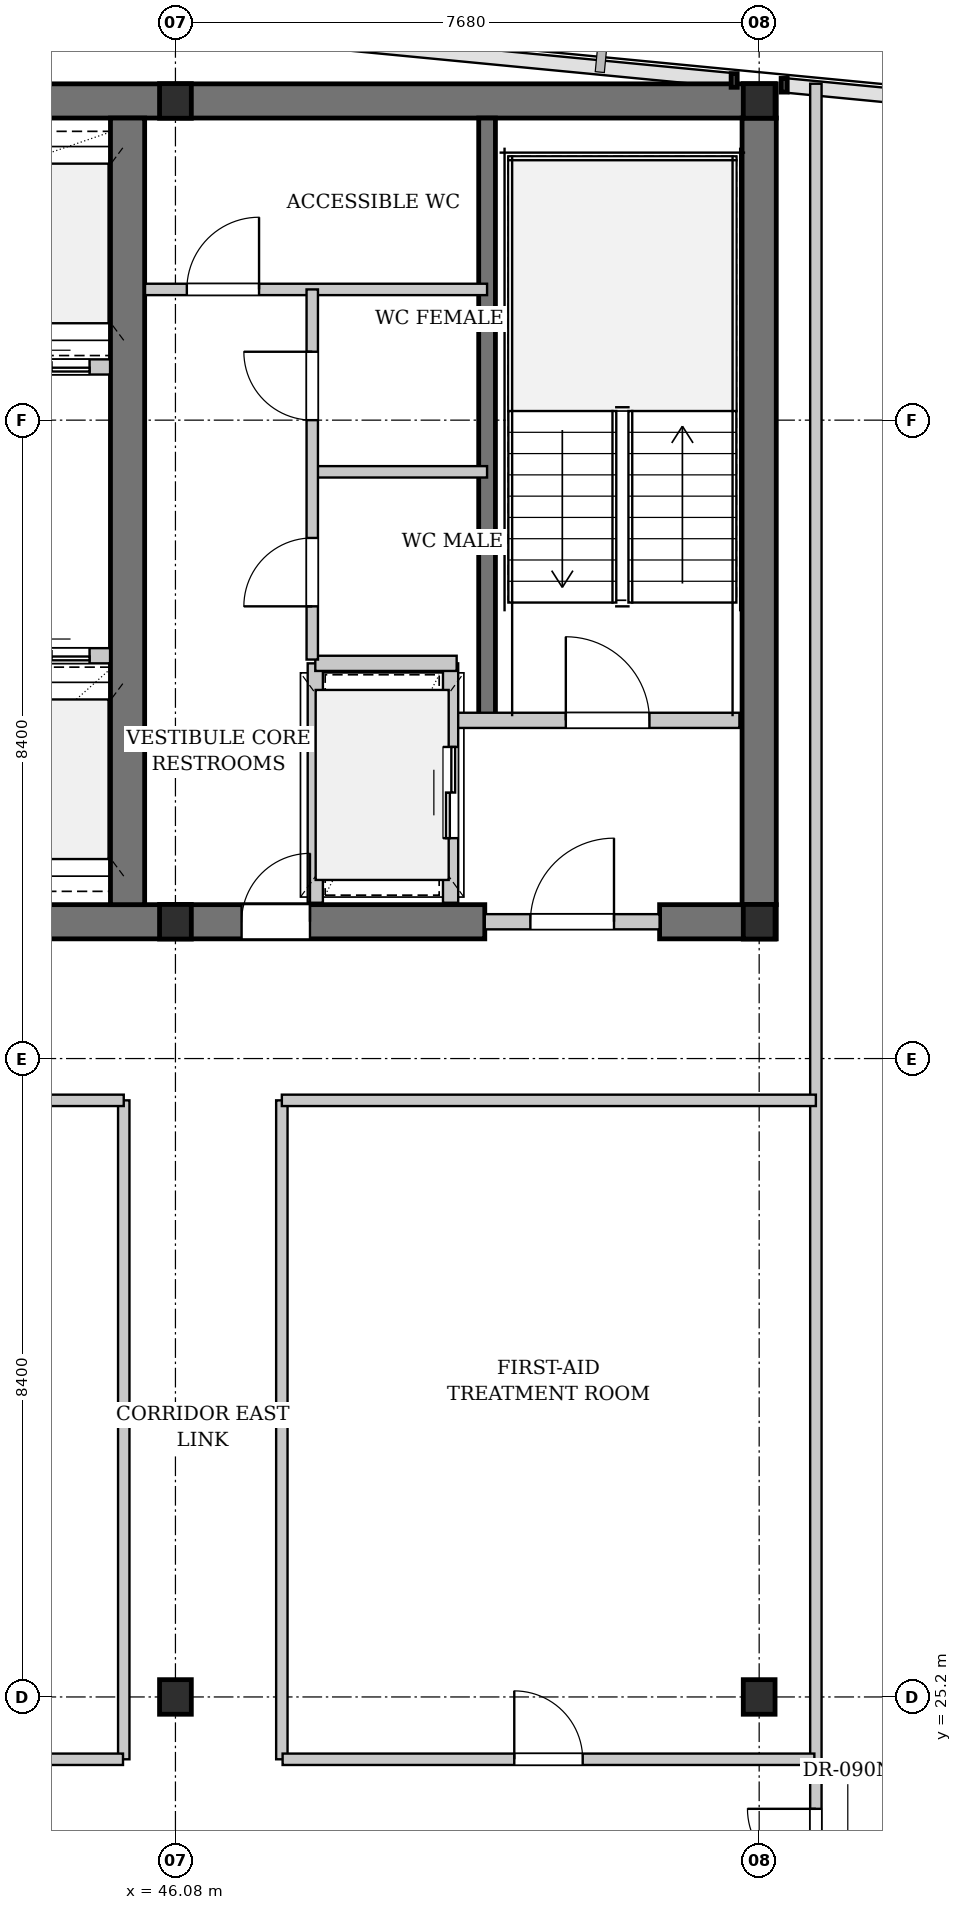
"""IFC4 building model, lengths in metres.
Left out: names, types, materials, properties, quantities, classifications, styles, units other than length and angle.
Written with IfcOpenShell. Run it as: python <this file> out.ifc"""

import sys

from ifc_helpers import new_model, si_unit, direction, frame, frame_2d, origin, origin_2d, place, context, subcontext, project, spatial, rectangle, i_section, extrude, element, fill, save


model = new_model("IFC4")
c1 = context("Model", 3, precision=1e-05, world=origin(), true_north=direction((0.0, 1.0)))
c2 = subcontext(c1, "Body", "Model", "MODEL_VIEW")
j1 = project(units=[si_unit("LENGTHUNIT", "METRE"), si_unit("PLANEANGLEUNIT", "RADIAN")], contexts=[c1])
p1 = place(None, origin())
s1 = spatial("IfcSite", under=j1, at=p1, CompositionType="ELEMENT")
p2 = place(p1, origin())
s2 = spatial("IfcBuilding", under=s1, at=p2, CompositionType="ELEMENT")
p3 = place(p2, frame((0.0, 0.0, 165.5)))
s3 = spatial("IfcBuildingStorey", under=s2, at=p3, CompositionType="ELEMENT", Elevation=165.5)
p4 = place(p3, frame((22.815, 46.2, 0.0), z_axis=(0.0, 0.0, 1.0), x_axis=(1.0, 0.0, 0.0)))
e1 = element("IfcWall", 1, at=p4, inside=s3, PredefinedType="SHEAR", context=c2, shape_type="SweptSolid", body=[
    extrude(rectangle(XDim=31.17, YDim=0.45, at=frame_2d((15.585, 0.0))), origin(), (0.0, 0.0, 1.0), 3.08),
])
p5 = place(p3, frame((42.1, 35.4, 0.0), z_axis=(0.0, 0.0, 1.0), x_axis=(1.0, 0.0, 0.0)))
e2 = element("IfcWall", 2, at=p5, inside=s3, PredefinedType="SHEAR", context=c2, shape_type="SweptSolid", body=[
    extrude(rectangle(XDim=8.05, YDim=0.45, at=frame_2d((4.025, 0.0))), origin(), (0.0, 0.0, 1.0), 3.08),
])
p6 = place(p5, frame((4.85, 0.0, 0.0)))
e3 = element("IfcOpeningElement", 3, at=p6, cuts=e2, PredefinedType="OPENING", context=c2, shape_type="SweptSolid", body=[
    extrude(rectangle(XDim=0.9, YDim=2.15, at=frame_2d((0.45, 1.075))), frame((0.0, 0.235, 0.0), z_axis=(0.0, -1.0, 0.0), x_axis=(1.0, 0.0, 0.0)), (0.0, 0.0, 1.0), 0.47),
])
p7 = place(p3, frame((52.45, 35.4, 0.0), z_axis=(0.0, 0.0, 1.0), x_axis=(1.0, 0.0, 0.0)))
e4 = element("IfcWall", 4, at=p7, inside=s3, PredefinedType="SHEAR", context=c2, shape_type="SweptSolid", body=[
    extrude(rectangle(XDim=1.535, YDim=0.45, at=frame_2d((0.768, 0.0))), origin(), (0.0, 0.0, 1.0), 3.08),
])
for number, where, z_axis, x_axis in (
    (5, (45.45, 35.625, 0.0), (0.0, 0.0, 1.0), (0.0, 1.0, 0.0)),
    (6, (53.76, 35.625, 0.0), (0.0, 0.0, 1.0), (0.0, 1.0, 0.0)),
):
    element("IfcWall", number, at=place(p3, frame(where, z_axis=z_axis, x_axis=x_axis)), inside=s3, PredefinedType="SHEAR", context=c2, shape_type="SweptSolid", body=[
        extrude(rectangle(XDim=10.35, YDim=0.45, at=frame_2d((5.175, 0.0))), origin(), (0.0, 0.0, 1.0), 3.08),
    ])
p8 = place(p3, frame((50.18, 38.05, 0.0), z_axis=(0.0, 0.0, 1.0), x_axis=(0.0, 1.0, 0.0)))
e7 = element("IfcWall", 7, at=p8, inside=s3, PredefinedType="SHEAR", context=c2, shape_type="SweptSolid", body=[
    extrude(rectangle(XDim=7.925, YDim=0.22, at=frame_2d((3.962, 0.0))), origin(), (0.0, 0.0, 1.0), 3.08),
])
for number, where, z_axis, x_axis in (
    (8, (46.08, 35.4, 0.0), (0.0, 0.0, 1.0), (1.0, 0.0, 0.0)),
    (9, (46.08, 46.2, 0.0), (0.0, 0.0, 1.0), (1.0, 0.0, 0.0)),
    (10, (46.08, 25.2, 0.0), (0.0, 0.0, 1.0), (1.0, 0.0, 0.0)),
    (11, (53.76, 35.4, 0.0), (0.0, 0.0, 1.0), (1.0, 0.0, 0.0)),
    (12, (53.76, 46.2, 0.0), (0.0, 0.0, 1.0), (1.0, 0.0, 0.0)),
    (13, (53.76, 25.2, 0.0), (0.0, 0.0, 1.0), (1.0, 0.0, 0.0)),
):
    element("IfcColumn", number, at=place(p3, frame(where, z_axis=z_axis, x_axis=x_axis)), inside=s3, PredefinedType="COLUMN", context=c2, shape_type="SweptSolid", body=[
        extrude(i_section(OverallWidth=0.418, OverallDepth=0.455, WebThickness=0.042, FlangeThickness=0.068, FilletRadius=0.015, at=origin_2d()), origin(), (0.0, 0.0, 1.0), 3.3),
    ])
p9 = place(p3, frame((41.85, 38.9, 0.0), z_axis=(0.0, 0.0, 1.0), x_axis=(1.0, 0.0, 0.0)))
e14 = element("IfcWall", 14, at=p9, inside=s3, PredefinedType="PARTITIONING", context=c2, shape_type="SweptSolid", body=[
    extrude(rectangle(XDim=3.37, YDim=0.2, at=frame_2d((1.685, 0.0))), origin(), (0.0, 0.0, 1.0), 3.08),
])
p10 = place(p9, frame((0.4, 0.0, 0.0)))
e15 = element("IfcOpeningElement", 15, at=p10, cuts=e14, PredefinedType="OPENING", context=c2, shape_type="SweptSolid", body=[
    extrude(rectangle(XDim=1.0, YDim=2.2, at=frame_2d((0.5, 1.1))), frame((0.0, 0.11, 0.0), z_axis=(0.0, -1.0, 0.0), x_axis=(1.0, 0.0, 0.0)), (0.0, 0.0, 1.0), 0.22),
])
p11 = place(p9, frame((2.1, 0.0, 0.0)))
e16 = element("IfcOpeningElement", 16, at=p11, cuts=e14, PredefinedType="OPENING", context=c2, shape_type="SweptSolid", body=[
    extrude(rectangle(XDim=1.0, YDim=2.2, at=frame_2d((0.5, 1.1))), frame((0.0, 0.11, 0.0), z_axis=(0.0, -1.0, 0.0), x_axis=(1.0, 0.0, 0.0)), (0.0, 0.0, 1.0), 0.22),
])
p12 = place(p3, frame((41.85, 42.7, 0.0), z_axis=(0.0, 0.0, 1.0), x_axis=(1.0, 0.0, 0.0)))
e17 = element("IfcWall", 17, at=p12, inside=s3, PredefinedType="PARTITIONING", context=c2, shape_type="SweptSolid", body=[
    extrude(rectangle(XDim=3.37, YDim=0.2, at=frame_2d((1.685, 0.0))), origin(), (0.0, 0.0, 1.0), 3.08),
])
p13 = place(p12, frame((0.4, 0.0, 0.0)))
e18 = element("IfcOpeningElement", 18, at=p13, cuts=e17, PredefinedType="OPENING", context=c2, shape_type="SweptSolid", body=[
    extrude(rectangle(XDim=1.0, YDim=2.2, at=frame_2d((0.5, 1.1))), frame((0.0, 0.11, 0.0), z_axis=(0.0, -1.0, 0.0), x_axis=(1.0, 0.0, 0.0)), (0.0, 0.0, 1.0), 0.22),
])
p14 = place(p12, frame((2.1, 0.0, 0.0)))
e19 = element("IfcOpeningElement", 19, at=p14, cuts=e17, PredefinedType="OPENING", context=c2, shape_type="SweptSolid", body=[
    extrude(rectangle(XDim=1.0, YDim=2.2, at=frame_2d((0.5, 1.1))), frame((0.0, 0.11, 0.0), z_axis=(0.0, -1.0, 0.0), x_axis=(1.0, 0.0, 0.0)), (0.0, 0.0, 1.0), 0.22),
])
p15 = place(p3, frame((49.78, 38.05, 0.0), z_axis=(0.0, 0.0, 1.0), x_axis=(1.0, 0.0, 0.0)))
e20 = element("IfcWall", 20, at=p15, inside=s3, PredefinedType="PARTITIONING", context=c2, shape_type="SweptSolid", body=[
    extrude(rectangle(XDim=3.72, YDim=0.2, at=frame_2d((1.86, 0.0))), origin(), (0.0, 0.0, 1.0), 3.08),
])
p16 = place(p15, frame((1.436, 0.0, 0.0)))
e21 = element("IfcOpeningElement", 21, at=p16, cuts=e20, PredefinedType="OPENING", context=c2, shape_type="SweptSolid", body=[
    extrude(rectangle(XDim=1.1, YDim=2.15, at=frame_2d((0.55, 1.075))), frame((0.0, 0.11, 0.0), z_axis=(0.0, -1.0, 0.0), x_axis=(1.0, 0.0, 0.0)), (0.0, 0.0, 1.0), 0.22),
])
p17 = place(p3, frame((50.15, 35.4, 0.0), z_axis=(0.0, 0.0, 1.0), x_axis=(1.0, 0.0, 0.0)))
e22 = element("IfcWall", 22, at=p17, inside=s3, PredefinedType="PARTITIONING", context=c2, shape_type="SweptSolid", body=[
    extrude(rectangle(XDim=2.3, YDim=0.2, at=frame_2d((1.15, 0.0))), origin(), (0.0, 0.0, 1.0), 2.475),
])
p18 = place(p17, frame((0.6, 0.0, 0.0)))
e23 = element("IfcOpeningElement", 23, at=p18, cuts=e22, PredefinedType="OPENING", context=c2, shape_type="SweptSolid", body=[
    extrude(rectangle(XDim=1.1, YDim=2.15, at=frame_2d((0.55, 1.075))), frame((0.0, 0.11, 0.0), z_axis=(0.0, -1.0, 0.0), x_axis=(1.0, 0.0, 0.0)), (0.0, 0.0, 1.0), 0.22),
])
p19 = place(p3, frame((49.7, 35.65, 0.0), z_axis=(0.0, 0.0, 1.0), x_axis=(0.0, 1.0, 0.0)))
e24 = element("IfcWall", 24, at=p19, inside=s3, PredefinedType="PARTITIONING", context=c2, shape_type="SweptSolid", body=[
    extrude(rectangle(XDim=3.15, YDim=0.2, at=frame_2d((1.575, 0.0))), origin(), (0.0, 0.0, 1.0), 3.08),
])
p20 = place(p19, frame((0.85, 0.0, 0.0)))
e25 = element("IfcOpeningElement", 25, at=p20, cuts=e24, PredefinedType="OPENING", context=c2, shape_type="SweptSolid", body=[
    extrude(rectangle(XDim=1.2, YDim=2.2, at=frame_2d((0.6, 1.1))), frame((0.0, 0.11, 0.0), z_axis=(0.0, -1.0, 0.0), x_axis=(1.0, 0.0, 0.0)), (0.0, 0.0, 1.0), 0.22),
])
p21 = place(p3, frame((47.92, 35.65, 0.0), z_axis=(0.0, 0.0, 1.0), x_axis=(0.0, 1.0, 0.0)))
e26 = element("IfcWall", 26, at=p21, inside=s3, PredefinedType="PARTITIONING", context=c2, shape_type="SweptSolid", body=[
    extrude(rectangle(XDim=3.15, YDim=0.2, at=frame_2d((1.575, 0.0))), origin(), (0.0, 0.0, 1.0), 3.08),
])
p22 = place(p3, frame((47.92, 38.8, 0.0), z_axis=(0.0, 0.0, 1.0), x_axis=(1.0, 0.0, 0.0)))
e27 = element("IfcWall", 27, at=p22, inside=s3, PredefinedType="PARTITIONING", context=c2, shape_type="SweptSolid", body=[
    extrude(rectangle(XDim=1.86, YDim=0.2, at=frame_2d((0.93, 0.0))), origin(), (0.0, 0.0, 1.0), 3.08),
])
p23 = place(p3, frame((45.68, 43.72, 0.0), z_axis=(0.0, 0.0, 1.0), x_axis=(1.0, 0.0, 0.0)))
e28 = element("IfcWall", 28, at=p23, inside=s3, PredefinedType="PARTITIONING", context=c2, shape_type="SweptSolid", body=[
    extrude(rectangle(XDim=4.5, YDim=0.15, at=frame_2d((2.25, 0.0))), origin(), (0.0, 0.0, 1.0), 3.08),
])
p24 = place(p23, frame((0.55, 0.0, 0.0)))
e29 = element("IfcOpeningElement", 29, at=p24, cuts=e28, PredefinedType="OPENING", context=c2, shape_type="SweptSolid", body=[
    extrude(rectangle(XDim=0.95, YDim=2.15, at=frame_2d((0.475, 1.075))), frame((0.0, 0.085, 0.0), z_axis=(0.0, -1.0, 0.0), x_axis=(1.0, 0.0, 0.0)), (0.0, 0.0, 1.0), 0.17),
])
p25 = place(p3, frame((47.88, 41.32, 0.0), z_axis=(0.0, 0.0, 1.0), x_axis=(1.0, 0.0, 0.0)))
e30 = element("IfcWall", 30, at=p25, inside=s3, PredefinedType="PARTITIONING", context=c2, shape_type="SweptSolid", body=[
    extrude(rectangle(XDim=2.3, YDim=0.15, at=frame_2d((1.15, 0.0))), origin(), (0.0, 0.0, 1.0), 3.08),
])
p26 = place(p3, frame((47.88, 38.85, 0.0), z_axis=(0.0, 0.0, 1.0), x_axis=(0.0, 1.0, 0.0)))
e31 = element("IfcWall", 31, at=p26, inside=s3, PredefinedType="PARTITIONING", context=c2, shape_type="SweptSolid", body=[
    extrude(rectangle(XDim=4.87, YDim=0.15, at=frame_2d((2.435, 0.0))), origin(), (0.0, 0.0, 1.0), 3.08),
])
p27 = place(p26, frame((0.7, 0.0, 0.0)))
e32 = element("IfcOpeningElement", 32, at=p27, cuts=e31, PredefinedType="OPENING", context=c2, shape_type="SweptSolid", body=[
    extrude(rectangle(XDim=0.9, YDim=2.15, at=frame_2d((0.45, 1.075))), frame((0.0, 0.085, 0.0), z_axis=(0.0, -1.0, 0.0), x_axis=(1.0, 0.0, 0.0)), (0.0, 0.0, 1.0), 0.17),
])
p28 = place(p26, frame((3.15, 0.0, 0.0)))
e33 = element("IfcOpeningElement", 33, at=p28, cuts=e31, PredefinedType="OPENING", context=c2, shape_type="SweptSolid", body=[
    extrude(rectangle(XDim=0.9, YDim=2.15, at=frame_2d((0.45, 1.075))), frame((0.0, 0.085, 0.0), z_axis=(0.0, -1.0, 0.0), x_axis=(1.0, 0.0, 0.0)), (0.0, 0.0, 1.0), 0.17),
])
p29 = place(p3, frame((54.506, 22.3, 0.0), z_axis=(0.0, 0.0, 1.0), x_axis=(0.0, 1.0, 0.0)))
e34 = element("IfcWall", 34, at=p29, inside=s3, PredefinedType="PARTITIONING", context=c2, shape_type="SweptSolid", body=[
    extrude(rectangle(XDim=24.126, YDim=0.15, at=frame_2d((12.063, 0.0))), origin(), (0.0, 0.0, 1.0), 3.08),
])
p30 = place(p29, frame((0.528, 0.0, 0.0)))
e35 = element("IfcOpeningElement", 35, at=p30, cuts=e34, PredefinedType="OPENING", context=c2, shape_type="SweptSolid", body=[
    extrude(rectangle(XDim=0.9, YDim=2.15, at=frame_2d((0.45, 1.075))), frame((0.0, 0.085, 0.0), z_axis=(0.0, -1.0, 0.0), x_axis=(1.0, 0.0, 0.0)), (0.0, 0.0, 1.0), 0.17),
])
for number, where, z_axis, x_axis in (
    (36, (45.4, 24.38, 0.0), (0.0, 0.0, 1.0), (0.0, 1.0, 0.0)),
    (37, (47.48, 24.38, 0.0), (0.0, 0.0, 1.0), (0.0, 1.0, 0.0)),
):
    element("IfcWall", number, at=place(p3, frame(where, z_axis=z_axis, x_axis=x_axis)), inside=s3, PredefinedType="PARTITIONING", context=c2, shape_type="SweptSolid", body=[
        extrude(rectangle(XDim=8.67, YDim=0.15, at=frame_2d((4.335, 0.0))), origin(), (0.0, 0.0, 1.0), 3.08),
    ])
p31 = place(p3, frame((31.48, 33.05, 0.0), z_axis=(0.0, 0.0, 1.0), x_axis=(1.0, 0.0, 0.0)))
e38 = element("IfcWall", 38, at=p31, inside=s3, PredefinedType="PARTITIONING", context=c2, shape_type="SweptSolid", body=[
    extrude(rectangle(XDim=13.92, YDim=0.15, at=frame_2d((6.96, 0.0))), origin(), (0.0, 0.0, 1.0), 3.08),
])
p32 = place(p3, frame((47.48, 33.05, 0.0), z_axis=(0.0, 0.0, 1.0), x_axis=(1.0, 0.0, 0.0)))
e39 = element("IfcWall", 39, at=p32, inside=s3, PredefinedType="PARTITIONING", context=c2, shape_type="SweptSolid", body=[
    extrude(rectangle(XDim=7.026, YDim=0.15, at=frame_2d((3.513, 0.0))), origin(), (0.0, 0.0, 1.0), 3.08),
])
p33 = place(p3, frame((31.49, 24.38, 0.0), z_axis=(0.0, 0.0, 1.0), x_axis=(1.0, 0.0, 0.0)))
e40 = element("IfcWall", 40, at=p33, inside=s3, PredefinedType="PARTITIONING", context=c2, shape_type="SweptSolid", body=[
    extrude(rectangle(XDim=13.9, YDim=0.15, at=frame_2d((6.95, 0.0))), origin(), (0.0, 0.0, 1.0), 3.08),
])
p34 = place(p33, frame((4.306, 0.0, 0.0)))
e41 = element("IfcOpeningElement", 41, at=p34, cuts=e40, PredefinedType="OPENING", context=c2, shape_type="SweptSolid", body=[
    extrude(rectangle(XDim=0.9, YDim=2.15, at=frame_2d((0.45, 1.075))), frame((0.0, 0.085, 0.0), z_axis=(0.0, -1.0, 0.0), x_axis=(1.0, 0.0, 0.0)), (0.0, 0.0, 1.0), 0.17),
])
p35 = place(p3, frame((47.49, 24.38, 0.0), z_axis=(0.0, 0.0, 1.0), x_axis=(1.0, 0.0, 0.0)))
e42 = element("IfcWall", 42, at=p35, inside=s3, PredefinedType="PARTITIONING", context=c2, shape_type="SweptSolid", body=[
    extrude(rectangle(XDim=6.996, YDim=0.15, at=frame_2d((3.498, 0.0))), origin(), (0.0, 0.0, 1.0), 3.08),
])
p36 = place(p35, frame((3.048, 0.0, 0.0)))
e43 = element("IfcOpeningElement", 43, at=p36, cuts=e42, PredefinedType="OPENING", context=c2, shape_type="SweptSolid", body=[
    extrude(rectangle(XDim=0.9, YDim=2.15, at=frame_2d((0.45, 1.075))), frame((0.0, 0.085, 0.0), z_axis=(0.0, -1.0, 0.0), x_axis=(1.0, 0.0, 0.0)), (0.0, 0.0, 1.0), 0.17),
])
p37 = place(p11, origin())
e44 = element("IfcDoor", 44, at=p37, inside=s3, OperationType="DOUBLE_DOOR_SLIDING", PredefinedType="DOOR", context=c2, shape_type="SweptSolid", body=[
    extrude(rectangle(XDim=1.0, YDim=2.2, at=frame_2d((0.5, 1.1))), frame((0.0, 0.025, 0.0), z_axis=(0.0, -1.0, 0.0), x_axis=(1.0, 0.0, 0.0)), (0.0, 0.0, 1.0), 0.05),
])
fill(e16, e44)
p38 = place(p14, origin())
e45 = element("IfcDoor", 45, at=p38, inside=s3, OperationType="DOUBLE_DOOR_SLIDING", PredefinedType="DOOR", context=c2, shape_type="SweptSolid", body=[
    extrude(rectangle(XDim=1.0, YDim=2.2, at=frame_2d((0.5, 1.1))), frame((0.0, 0.025, 0.0), z_axis=(0.0, -1.0, 0.0), x_axis=(1.0, 0.0, 0.0)), (0.0, 0.0, 1.0), 0.05),
])
fill(e19, e45)
p39 = place(p16, origin())
e46 = element("IfcDoor", 46, at=p39, inside=s3, OperationType="SINGLE_SWING_LEFT", PredefinedType="DOOR", context=c2, shape_type="SweptSolid", body=[
    extrude(rectangle(XDim=1.1, YDim=2.15, at=frame_2d((0.55, 1.075))), frame((0.0, 0.025, 0.0), z_axis=(0.0, -1.0, 0.0), x_axis=(1.0, 0.0, 0.0)), (0.0, 0.0, 1.0), 0.05),
])
fill(e21, e46)
p40 = place(p18, origin())
e47 = element("IfcDoor", 47, at=p40, inside=s3, OperationType="SINGLE_SWING_RIGHT", PredefinedType="DOOR", context=c2, shape_type="SweptSolid", body=[
    extrude(rectangle(XDim=1.1, YDim=2.15, at=frame_2d((0.55, 1.075))), frame((0.0, 0.025, 0.0), z_axis=(0.0, -1.0, 0.0), x_axis=(1.0, 0.0, 0.0)), (0.0, 0.0, 1.0), 0.05),
])
fill(e23, e47)
p41 = place(p20, origin())
e48 = element("IfcDoor", 48, at=p41, inside=s3, OperationType="DOUBLE_DOOR_SLIDING", PredefinedType="DOOR", context=c2, shape_type="SweptSolid", body=[
    extrude(rectangle(XDim=1.2, YDim=2.2, at=frame_2d((0.6, 1.1))), frame((0.0, 0.025, 0.0), z_axis=(0.0, -1.0, 0.0), x_axis=(1.0, 0.0, 0.0)), (0.0, 0.0, 1.0), 0.05),
])
fill(e25, e48)
p42 = place(p24, origin())
e49 = element("IfcDoor", 49, at=p42, inside=s3, OperationType="SINGLE_SWING_RIGHT", PredefinedType="DOOR", context=c2, shape_type="SweptSolid", body=[
    extrude(rectangle(XDim=0.95, YDim=2.15, at=frame_2d((0.475, 1.075))), frame((0.0, 0.025, 0.0), z_axis=(0.0, -1.0, 0.0), x_axis=(1.0, 0.0, 0.0)), (0.0, 0.0, 1.0), 0.05),
])
fill(e29, e49)
p43 = place(p27, origin())
e50 = element("IfcDoor", 50, at=p43, inside=s3, OperationType="SINGLE_SWING_LEFT", PredefinedType="DOOR", context=c2, shape_type="SweptSolid", body=[
    extrude(rectangle(XDim=0.9, YDim=2.15, at=frame_2d((0.45, 1.075))), frame((0.0, 0.025, 0.0), z_axis=(0.0, -1.0, 0.0), x_axis=(1.0, 0.0, 0.0)), (0.0, 0.0, 1.0), 0.05),
])
fill(e32, e50)
p44 = place(p28, origin())
e51 = element("IfcDoor", 51, at=p44, inside=s3, OperationType="SINGLE_SWING_RIGHT", PredefinedType="DOOR", context=c2, shape_type="SweptSolid", body=[
    extrude(rectangle(XDim=0.9, YDim=2.15, at=frame_2d((0.45, 1.075))), frame((0.0, 0.025, 0.0), z_axis=(0.0, -1.0, 0.0), x_axis=(1.0, 0.0, 0.0)), (0.0, 0.0, 1.0), 0.05),
])
fill(e33, e51)
p45 = place(p30, origin())
e52 = element("IfcDoor", 52, at=p45, inside=s3, OperationType="SINGLE_SWING_RIGHT", PredefinedType="DOOR", context=c2, shape_type="SweptSolid", body=[
    extrude(rectangle(XDim=0.9, YDim=2.15, at=frame_2d((0.45, 1.075))), frame((0.0, 0.025, 0.0), z_axis=(0.0, -1.0, 0.0), x_axis=(1.0, 0.0, 0.0)), (0.0, 0.0, 1.0), 0.05),
])
fill(e35, e52)
p46 = place(p36, origin())
e53 = element("IfcDoor", 53, at=p46, inside=s3, OperationType="SINGLE_SWING_LEFT", PredefinedType="DOOR", context=c2, shape_type="SweptSolid", body=[
    extrude(rectangle(XDim=0.9, YDim=2.15, at=frame_2d((0.45, 1.075))), frame((0.0, 0.025, 0.0), z_axis=(0.0, -1.0, 0.0), x_axis=(1.0, 0.0, 0.0)), (0.0, 0.0, 1.0), 0.05),
])
fill(e43, e53)
p47 = place(p6, origin())
e54 = element("IfcDoor", 54, at=p47, inside=s3, OperationType="SINGLE_SWING_RIGHT", PredefinedType="DOOR", context=c2, shape_type="SweptSolid", body=[
    extrude(rectangle(XDim=0.9, YDim=2.15, at=frame_2d((0.45, 1.075))), frame((0.0, 0.025, 0.0), z_axis=(0.0, -1.0, 0.0), x_axis=(1.0, 0.0, 0.0)), (0.0, 0.0, 1.0), 0.05),
])
fill(e3, e54)
save(model, sys.argv[1])
